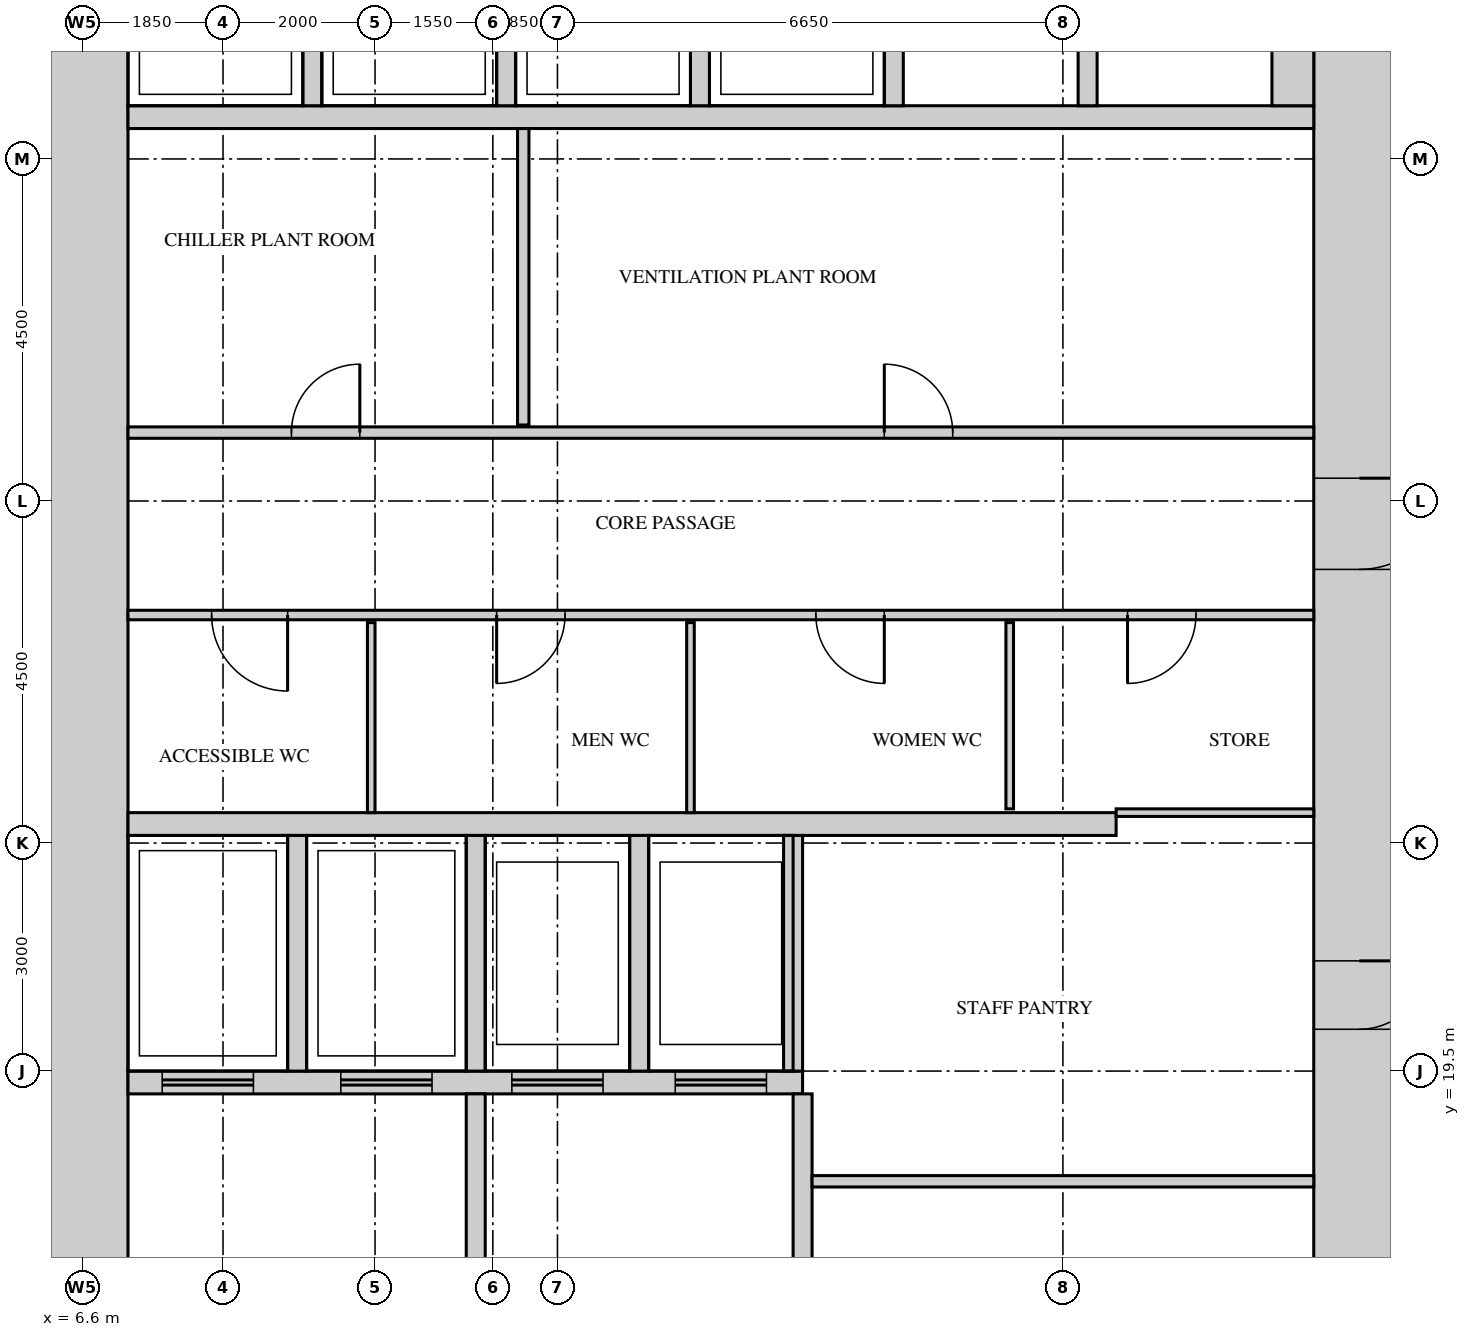
"""IFC4 building model, lengths in metres.
Left out: names, types, materials, properties, quantities, classifications, styles, units other than length and angle.
Written with IfcOpenShell. Run it as: python <this file> out.ifc"""

import sys

from ifc_helpers import new_model, si_unit, direction, frame, frame_2d, origin, place, context, subcontext, project, spatial, rectangle, extrude, source, transform, mapped, element, fill, save


model = new_model("IFC4")
c1 = context("Model", 3, precision=1e-05, world=origin(), true_north=direction((0.0, 1.0)))
c2 = subcontext(c1, "Body", "Model", "MODEL_VIEW")
j1 = project(units=[si_unit("LENGTHUNIT", "METRE"), si_unit("PLANEANGLEUNIT", "RADIAN")], contexts=[c1])
p1 = place(None, origin())
s1 = spatial("IfcSite", under=j1, at=p1, CompositionType="ELEMENT")
p2 = place(p1, origin())
s2 = spatial("IfcBuilding", under=s1, at=p2, CompositionType="ELEMENT")
p3 = place(p2, frame((0.0, 0.0, 91.5)))
s3 = spatial("IfcBuildingStorey", under=s2, at=p3, CompositionType="ELEMENT", Elevation=91.5)
m1 = source(origin(), c2, "Body", "SweptSolid", [
    extrude(rectangle(XDim=27.6, YDim=1.2, at=frame_2d((13.8, 0.0))), origin(), (0.0, 0.0, 1.0), 4.2),
])
p4 = place(p3, frame((23.4, 13.2, 0.0), z_axis=(0.0, 0.0, 1.0), x_axis=(0.0, 1.0, 0.0)))
e1 = element("IfcWall", 1, at=p4, inside=s3, PredefinedType="SHEAR", context=c2, shape_type="MappedRepresentation", body=[
    mapped(m1, transform((0.0, 0.0, 0.0))),
])
m2 = source(origin(), c2, "Body", "SweptSolid", [
    extrude(rectangle(XDim=1.8, YDim=2.1, at=frame_2d((0.9, 1.05))), frame((0.0, 0.61, 0.0), z_axis=(0.0, -1.0, 0.0), x_axis=(1.0, 0.0, 0.0)), (0.0, 0.0, 1.0), 1.22),
])
p5 = place(p4, frame((22.4, 0.0, 0.0)))
e2 = element("IfcOpeningElement", 2, at=p5, cuts=e1, PredefinedType="OPENING", context=c2, shape_type="MappedRepresentation", body=[
    mapped(m2, transform((0.0, 0.0, 0.0))),
])
m3 = source(origin(), c2, "Body", "SweptSolid", [
    extrude(rectangle(XDim=1.2, YDim=2.1, at=frame_2d((0.6, 1.05))), frame((0.0, 0.61, 0.0), z_axis=(0.0, -1.0, 0.0), x_axis=(1.0, 0.0, 0.0)), (0.0, 0.0, 1.0), 1.22),
])
p6 = place(p4, frame((12.9, 0.0, 0.0)))
e3 = element("IfcOpeningElement", 3, at=p6, cuts=e1, PredefinedType="OPENING", context=c2, shape_type="MappedRepresentation", body=[
    mapped(m3, transform((0.0, 0.0, 0.0))),
])
m4 = source(origin(), c2, "Body", "SweptSolid", [
    extrude(rectangle(XDim=0.9, YDim=2.1, at=frame_2d((0.45, 1.05))), frame((0.0, 0.61, 0.0), z_axis=(0.0, -1.0, 0.0), x_axis=(1.0, 0.0, 0.0)), (0.0, 0.0, 1.0), 1.22),
])
p7 = place(p4, frame((2.0, 0.0, 0.0)))
e4 = element("IfcOpeningElement", 4, at=p7, cuts=e1, PredefinedType="OPENING", context=c2, shape_type="MappedRepresentation", body=[
    mapped(m4, transform((0.0, 0.0, 0.0))),
])
p8 = place(p4, frame((6.85, 0.0, 0.0)))
e5 = element("IfcOpeningElement", 5, at=p8, cuts=e1, PredefinedType="OPENING", context=c2, shape_type="MappedRepresentation", body=[
    mapped(m4, transform((0.0, 0.0, 0.0))),
])
p9 = place(p3, frame((6.6, 13.2, 0.0), z_axis=(0.0, 0.0, 1.0), x_axis=(0.0, 1.0, 0.0)))
e6 = element("IfcWall", 6, at=p9, inside=s3, PredefinedType="SHEAR", context=c2, shape_type="MappedRepresentation", body=[
    mapped(m1, transform((0.0, 0.0, 0.0))),
])
m5 = source(origin(), c2, "Body", "SweptSolid", [
    extrude(rectangle(XDim=13.0, YDim=0.3, at=frame_2d((6.5, 0.0))), origin(), (0.0, 0.0, 1.0), 4.2),
])
p10 = place(p3, frame((7.2, 22.75, 0.0), z_axis=(0.0, 0.0, 1.0), x_axis=(1.0, 0.0, 0.0)))
e7 = element("IfcWall", 7, at=p10, inside=s3, PredefinedType="STANDARD", context=c2, shape_type="MappedRepresentation", body=[
    mapped(m5, transform((0.0, 0.0, 0.0))),
])
m6 = source(origin(), c2, "Body", "SweptSolid", [
    extrude(rectangle(XDim=8.875, YDim=0.3, at=frame_2d((4.438, 0.0))), origin(), (0.0, 0.0, 1.0), 4.2),
])
p11 = place(p3, frame((7.2, 19.35, 0.0), z_axis=(0.0, 0.0, 1.0), x_axis=(1.0, 0.0, 0.0)))
e8 = element("IfcWall", 8, at=p11, inside=s3, PredefinedType="STANDARD", context=c2, shape_type="MappedRepresentation", body=[
    mapped(m6, transform((0.0, 0.0, 0.0))),
])
m7 = source(origin(), c2, "Body", "SweptSolid", [
    extrude(rectangle(XDim=1.2, YDim=2.1, at=frame_2d((0.6, 1.05))), frame((0.0, 0.16, 0.0), z_axis=(0.0, -1.0, 0.0), x_axis=(1.0, 0.0, 0.0)), (0.0, 0.0, 1.0), 0.32),
])
p12 = place(p11, frame((0.45, 0.0, 0.0)))
e9 = element("IfcOpeningElement", 9, at=p12, cuts=e8, PredefinedType="OPENING", context=c2, shape_type="MappedRepresentation", body=[
    mapped(m7, transform((0.0, 0.0, 0.0))),
])
p13 = place(p11, frame((2.8, 0.0, 0.0)))
e10 = element("IfcOpeningElement", 10, at=p13, cuts=e8, PredefinedType="OPENING", context=c2, shape_type="MappedRepresentation", body=[
    mapped(m7, transform((0.0, 0.0, 0.0))),
])
p14 = place(p11, frame((5.05, 0.0, 0.0)))
e11 = element("IfcOpeningElement", 11, at=p14, cuts=e8, PredefinedType="OPENING", context=c2, shape_type="MappedRepresentation", body=[
    mapped(m7, transform((0.0, 0.0, 0.0))),
])
p15 = place(p11, frame((7.2, 0.0, 0.0)))
e12 = element("IfcOpeningElement", 12, at=p15, cuts=e8, PredefinedType="OPENING", context=c2, shape_type="MappedRepresentation", body=[
    mapped(m7, transform((0.0, 0.0, 0.0))),
])
m8 = source(origin(), c2, "Body", "SweptSolid", [
    extrude(rectangle(XDim=15.6, YDim=0.3, at=frame_2d((7.8, 0.0))), origin(), (0.0, 0.0, 1.0), 4.2),
])
p16 = place(p3, frame((7.2, 32.05, 0.0), z_axis=(0.0, 0.0, 1.0), x_axis=(1.0, 0.0, 0.0)))
e13 = element("IfcWall", 13, at=p16, inside=s3, PredefinedType="STANDARD", context=c2, shape_type="MappedRepresentation", body=[
    mapped(m8, transform((0.0, 0.0, 0.0))),
])
m9 = source(origin(), c2, "Body", "SweptSolid", [
    extrude(rectangle(XDim=3.1, YDim=0.25, at=frame_2d((1.55, 0.0))), origin(), (0.0, 0.0, 1.0), 4.2),
])
for number, where, z_axis, x_axis in (
    (14, (9.425, 19.5, 0.0), (0.0, 0.0, 1.0), (0.0, 1.0, 0.0)),
    (15, (11.775, 19.5, 0.0), (0.0, 0.0, 1.0), (0.0, 1.0, 0.0)),
    (16, (13.925, 19.5, 0.0), (0.0, 0.0, 1.0), (0.0, 1.0, 0.0)),
    (17, (15.95, 19.5, 0.0), (0.0, 0.0, 1.0), (0.0, 1.0, 0.0)),
):
    element("IfcWall", number, at=place(p3, frame(where, z_axis=z_axis, x_axis=x_axis)), inside=s3, PredefinedType="STANDARD", context=c2, shape_type="MappedRepresentation", body=[
        mapped(m9, transform((0.0, 0.0, 0.0))),
    ])
m10 = source(origin(), c2, "Body", "SweptSolid", [
    extrude(rectangle(XDim=2.4, YDim=0.25, at=frame_2d((1.2, 0.0))), origin(), (0.0, 0.0, 1.0), 4.2),
])
for number, where, z_axis, x_axis in (
    (18, (9.625, 32.2, 0.0), (0.0, 0.0, 1.0), (0.0, 1.0, 0.0)),
    (19, (12.175, 32.2, 0.0), (0.0, 0.0, 1.0), (0.0, 1.0, 0.0)),
    (20, (14.725, 32.2, 0.0), (0.0, 0.0, 1.0), (0.0, 1.0, 0.0)),
    (21, (17.275, 32.2, 0.0), (0.0, 0.0, 1.0), (0.0, 1.0, 0.0)),
    (22, (19.825, 32.2, 0.0), (0.0, 0.0, 1.0), (0.0, 1.0, 0.0)),
):
    element("IfcWall", number, at=place(p3, frame(where, z_axis=z_axis, x_axis=x_axis)), inside=s3, PredefinedType="STANDARD", context=c2, shape_type="MappedRepresentation", body=[
        mapped(m10, transform((0.0, 0.0, 0.0))),
    ])
m11 = source(origin(), c2, "Body", "SweptSolid", [
    extrude(rectangle(XDim=2.4, YDim=0.55, at=frame_2d((1.2, 0.0))), origin(), (0.0, 0.0, 1.0), 4.2),
])
p17 = place(p3, frame((22.525, 32.2, 0.0), z_axis=(0.0, 0.0, 1.0), x_axis=(0.0, 1.0, 0.0)))
e23 = element("IfcWall", 23, at=p17, inside=s3, PredefinedType="STANDARD", context=c2, shape_type="MappedRepresentation", body=[
    mapped(m11, transform((0.0, 0.0, 0.0))),
])
m12 = source(origin(), c2, "Body", "SweptSolid", [
    extrude(rectangle(XDim=3.4, YDim=0.25, at=frame_2d((1.7, 0.0))), origin(), (0.0, 0.0, 1.0), 4.2),
])
for number, where, z_axis, x_axis in (
    (24, (16.075, 15.8, 0.0), (0.0, 0.0, 1.0), (0.0, 1.0, 0.0)),
    (25, (11.775, 15.8, 0.0), (0.0, 0.0, 1.0), (0.0, 1.0, 0.0)),
):
    element("IfcWall", number, at=place(p3, frame(where, z_axis=z_axis, x_axis=x_axis)), inside=s3, PredefinedType="STANDARD", context=c2, shape_type="MappedRepresentation", body=[
        mapped(m12, transform((0.0, 0.0, 0.0))),
    ])
m13 = source(origin(), c2, "Body", "SweptSolid", [
    extrude(rectangle(XDim=6.6, YDim=0.15, at=frame_2d((3.3, 0.0))), origin(), (0.0, 0.0, 1.0), 4.3),
])
p18 = place(p3, frame((16.2, 18.05, 0.0), z_axis=(0.0, 0.0, 1.0), x_axis=(1.0, 0.0, 0.0)))
e26 = element("IfcWall", 26, at=p18, inside=s3, PredefinedType="PARTITIONING", context=c2, shape_type="MappedRepresentation", body=[
    mapped(m13, transform((0.0, 0.0, 0.0))),
])
m14 = source(origin(), c2, "Body", "SweptSolid", [
    extrude(rectangle(XDim=2.5, YDim=0.1, at=frame_2d((1.25, 0.0))), origin(), (0.0, 0.0, 1.0), 4.3),
])
for number, where, z_axis, x_axis in (
    (27, (10.4, 22.9, 0.0), (0.0, 0.0, 1.0), (0.0, 1.0, 0.0)),
    (28, (14.6, 22.9, 0.0), (0.0, 0.0, 1.0), (0.0, 1.0, 0.0)),
):
    element("IfcWall", number, at=place(p3, frame(where, z_axis=z_axis, x_axis=x_axis)), inside=s3, PredefinedType="PARTITIONING", context=c2, shape_type="MappedRepresentation", body=[
        mapped(m14, transform((0.0, 0.0, 0.0))),
    ])
m15 = source(origin(), c2, "Body", "SweptSolid", [
    extrude(rectangle(XDim=2.6, YDim=0.1, at=frame_2d((1.3, 0.0))), origin(), (0.0, 0.0, 1.0), 4.3),
])
p19 = place(p3, frame((20.2, 22.9, 0.0), z_axis=(0.0, 0.0, 1.0), x_axis=(1.0, 0.0, 0.0)))
e29 = element("IfcWall", 29, at=p19, inside=s3, PredefinedType="PARTITIONING", context=c2, shape_type="MappedRepresentation", body=[
    mapped(m15, transform((0.0, 0.0, 0.0))),
])
m16 = source(origin(), c2, "Body", "SweptSolid", [
    extrude(rectangle(XDim=2.45, YDim=0.1, at=frame_2d((1.225, 0.0))), origin(), (0.0, 0.0, 1.0), 4.3),
])
p20 = place(p3, frame((18.8, 22.95, 0.0), z_axis=(0.0, 0.0, 1.0), x_axis=(0.0, 1.0, 0.0)))
e30 = element("IfcWall", 30, at=p20, inside=s3, PredefinedType="PARTITIONING", context=c2, shape_type="MappedRepresentation", body=[
    mapped(m16, transform((0.0, 0.0, 0.0))),
])
m17 = source(origin(), c2, "Body", "SweptSolid", [
    extrude(rectangle(XDim=15.6, YDim=0.125, at=frame_2d((7.8, 0.0))), origin(), (0.0, 0.0, 1.0), 4.3),
])
p21 = place(p3, frame((7.2, 25.5, 0.0), z_axis=(0.0, 0.0, 1.0), x_axis=(1.0, 0.0, 0.0)))
e31 = element("IfcWall", 31, at=p21, inside=s3, PredefinedType="PARTITIONING", context=c2, shape_type="MappedRepresentation", body=[
    mapped(m17, transform((0.0, 0.0, 0.0))),
])
m18 = source(origin(), c2, "Body", "SweptSolid", [
    extrude(rectangle(XDim=1.0, YDim=2.1, at=frame_2d((0.5, 1.05))), frame((0.0, 0.073, 0.0), z_axis=(0.0, -1.0, 0.0), x_axis=(1.0, 0.0, 0.0)), (0.0, 0.0, 1.0), 0.145),
])
p22 = place(p21, frame((1.1, 0.0, 0.0)))
e32 = element("IfcOpeningElement", 32, at=p22, cuts=e31, PredefinedType="OPENING", context=c2, shape_type="MappedRepresentation", body=[
    mapped(m18, transform((0.0, 0.0, 0.0))),
])
m19 = source(origin(), c2, "Body", "SweptSolid", [
    extrude(rectangle(XDim=0.9, YDim=2.1, at=frame_2d((0.45, 1.05))), frame((0.0, 0.073, 0.0), z_axis=(0.0, -1.0, 0.0), x_axis=(1.0, 0.0, 0.0)), (0.0, 0.0, 1.0), 0.145),
])
p23 = place(p21, frame((4.85, 0.0, 0.0)))
e33 = element("IfcOpeningElement", 33, at=p23, cuts=e31, PredefinedType="OPENING", context=c2, shape_type="MappedRepresentation", body=[
    mapped(m19, transform((0.0, 0.0, 0.0))),
])
p24 = place(p21, frame((9.05, 0.0, 0.0)))
e34 = element("IfcOpeningElement", 34, at=p24, cuts=e31, PredefinedType="OPENING", context=c2, shape_type="MappedRepresentation", body=[
    mapped(m19, transform((0.0, 0.0, 0.0))),
])
p25 = place(p21, frame((13.15, 0.0, 0.0)))
e35 = element("IfcOpeningElement", 35, at=p25, cuts=e31, PredefinedType="OPENING", context=c2, shape_type="MappedRepresentation", body=[
    mapped(m19, transform((0.0, 0.0, 0.0))),
])
m20 = source(origin(), c2, "Body", "SweptSolid", [
    extrude(rectangle(XDim=15.6, YDim=0.15, at=frame_2d((7.8, 0.0))), origin(), (0.0, 0.0, 1.0), 4.3),
])
p26 = place(p3, frame((7.2, 27.9, 0.0), z_axis=(0.0, 0.0, 1.0), x_axis=(1.0, 0.0, 0.0)))
e36 = element("IfcWall", 36, at=p26, inside=s3, PredefinedType="PARTITIONING", context=c2, shape_type="MappedRepresentation", body=[
    mapped(m20, transform((0.0, 0.0, 0.0))),
])
m21 = source(origin(), c2, "Body", "SweptSolid", [
    extrude(rectangle(XDim=0.9, YDim=2.1, at=frame_2d((0.45, 1.05))), frame((0.0, 0.085, 0.0), z_axis=(0.0, -1.0, 0.0), x_axis=(1.0, 0.0, 0.0)), (0.0, 0.0, 1.0), 0.17),
])
p27 = place(p26, frame((2.15, 0.0, 0.0)))
e37 = element("IfcOpeningElement", 37, at=p27, cuts=e36, PredefinedType="OPENING", context=c2, shape_type="MappedRepresentation", body=[
    mapped(m21, transform((0.0, 0.0, 0.0))),
])
p28 = place(p26, frame((9.95, 0.0, 0.0)))
e38 = element("IfcOpeningElement", 38, at=p28, cuts=e36, PredefinedType="OPENING", context=c2, shape_type="MappedRepresentation", body=[
    mapped(m21, transform((0.0, 0.0, 0.0))),
])
m22 = source(origin(), c2, "Body", "SweptSolid", [
    extrude(rectangle(XDim=3.9, YDim=0.15, at=frame_2d((1.95, 0.0))), origin(), (0.0, 0.0, 1.0), 4.3),
])
p29 = place(p3, frame((12.4, 28.0, 0.0), z_axis=(0.0, 0.0, 1.0), x_axis=(0.0, 1.0, 0.0)))
e39 = element("IfcWall", 39, at=p29, inside=s3, PredefinedType="PARTITIONING", context=c2, shape_type="MappedRepresentation", body=[
    mapped(m22, transform((0.0, 0.0, 0.0))),
])
m23 = source(origin(), c2, "Body", "SweptSolid", [
    extrude(rectangle(XDim=1.2, YDim=2.1, at=frame_2d((0.6, 1.05))), frame((0.0, 0.55, 0.0), z_axis=(0.0, -1.0, 0.0), x_axis=(1.0, 0.0, 0.0)), (0.0, 0.0, 1.0), 1.1),
])
p30 = place(p6, origin())
e40 = element("IfcDoor", 40, at=p30, inside=s3, OperationType="SINGLE_SWING_RIGHT", PredefinedType="DOOR", context=c2, shape_type="MappedRepresentation", body=[
    mapped(m23, transform((0.0, 0.0, 0.0))),
])
fill(e3, e40)
m24 = source(origin(), c2, "Body", "SweptSolid", [
    extrude(rectangle(XDim=0.9, YDim=2.1, at=frame_2d((0.45, 1.05))), frame((0.0, 0.025, 0.0), z_axis=(0.0, -1.0, 0.0), x_axis=(1.0, 0.0, 0.0)), (0.0, 0.0, 1.0), 0.05),
])
p31 = place(p27, origin())
e41 = element("IfcDoor", 41, at=p31, inside=s3, OperationType="SINGLE_SWING_LEFT", PredefinedType="DOOR", context=c2, shape_type="MappedRepresentation", body=[
    mapped(m24, transform((0.0, 0.0, 0.0))),
])
fill(e37, e41)
p32 = place(p28, origin())
e42 = element("IfcDoor", 42, at=p32, inside=s3, OperationType="SINGLE_SWING_RIGHT", PredefinedType="DOOR", context=c2, shape_type="MappedRepresentation", body=[
    mapped(m24, transform((0.0, 0.0, 0.0))),
])
fill(e38, e42)
m25 = source(origin(), c2, "Body", "SweptSolid", [
    extrude(rectangle(XDim=1.0, YDim=2.1, at=frame_2d((0.5, 1.05))), frame((0.0, 0.025, 0.0), z_axis=(0.0, -1.0, 0.0), x_axis=(1.0, 0.0, 0.0)), (0.0, 0.0, 1.0), 0.05),
])
p33 = place(p22, origin())
e43 = element("IfcDoor", 43, at=p33, inside=s3, OperationType="SINGLE_SWING_RIGHT", PredefinedType="DOOR", context=c2, shape_type="MappedRepresentation", body=[
    mapped(m25, transform((0.0, 0.0, 0.0))),
])
fill(e32, e43)
p34 = place(p23, origin())
e44 = element("IfcDoor", 44, at=p34, inside=s3, OperationType="SINGLE_SWING_LEFT", PredefinedType="DOOR", context=c2, shape_type="MappedRepresentation", body=[
    mapped(m24, transform((0.0, 0.0, 0.0))),
])
fill(e33, e44)
p35 = place(p24, origin())
e45 = element("IfcDoor", 45, at=p35, inside=s3, OperationType="SINGLE_SWING_RIGHT", PredefinedType="DOOR", context=c2, shape_type="MappedRepresentation", body=[
    mapped(m24, transform((0.0, 0.0, 0.0))),
])
fill(e34, e45)
p36 = place(p25, origin())
e46 = element("IfcDoor", 46, at=p36, inside=s3, OperationType="SINGLE_SWING_LEFT", PredefinedType="DOOR", context=c2, shape_type="MappedRepresentation", body=[
    mapped(m24, transform((0.0, 0.0, 0.0))),
])
fill(e35, e46)
m26 = source(origin(), c2, "Body", "SweptSolid", [
    extrude(rectangle(XDim=0.9, YDim=2.1, at=frame_2d((0.45, 1.05))), frame((0.0, 0.55, 0.0), z_axis=(0.0, -1.0, 0.0), x_axis=(1.0, 0.0, 0.0)), (0.0, 0.0, 1.0), 1.1),
])
p37 = place(p8, origin())
e47 = element("IfcDoor", 47, at=p37, inside=s3, OperationType="SINGLE_SWING_RIGHT", PredefinedType="DOOR", context=c2, shape_type="MappedRepresentation", body=[
    mapped(m26, transform((0.0, 0.0, 0.0))),
])
fill(e5, e47)
m27 = source(origin(), c2, "Body", "SweptSolid", [
    extrude(rectangle(XDim=1.2, YDim=2.1, at=frame_2d((0.6, 1.05))), frame((0.0, 0.025, 0.0), z_axis=(0.0, -1.0, 0.0), x_axis=(1.0, 0.0, 0.0)), (0.0, 0.0, 1.0), 0.05),
])
p38 = place(p12, origin())
e48 = element("IfcDoor", 48, at=p38, inside=s3, OperationType="DOUBLE_DOOR_SLIDING", PredefinedType="DOOR", context=c2, shape_type="MappedRepresentation", body=[
    mapped(m27, transform((0.0, 0.0, 0.0))),
])
fill(e9, e48)
p39 = place(p13, origin())
e49 = element("IfcDoor", 49, at=p39, inside=s3, OperationType="DOUBLE_DOOR_SLIDING", PredefinedType="DOOR", context=c2, shape_type="MappedRepresentation", body=[
    mapped(m27, transform((0.0, 0.0, 0.0))),
])
fill(e10, e49)
p40 = place(p14, origin())
e50 = element("IfcDoor", 50, at=p40, inside=s3, OperationType="DOUBLE_DOOR_SLIDING", PredefinedType="DOOR", context=c2, shape_type="MappedRepresentation", body=[
    mapped(m27, transform((0.0, 0.0, 0.0))),
])
fill(e11, e50)
p41 = place(p15, origin())
e51 = element("IfcDoor", 51, at=p41, inside=s3, OperationType="DOUBLE_DOOR_SLIDING", PredefinedType="DOOR", context=c2, shape_type="MappedRepresentation", body=[
    mapped(m27, transform((0.0, 0.0, 0.0))),
])
fill(e12, e51)
save(model, sys.argv[1])
